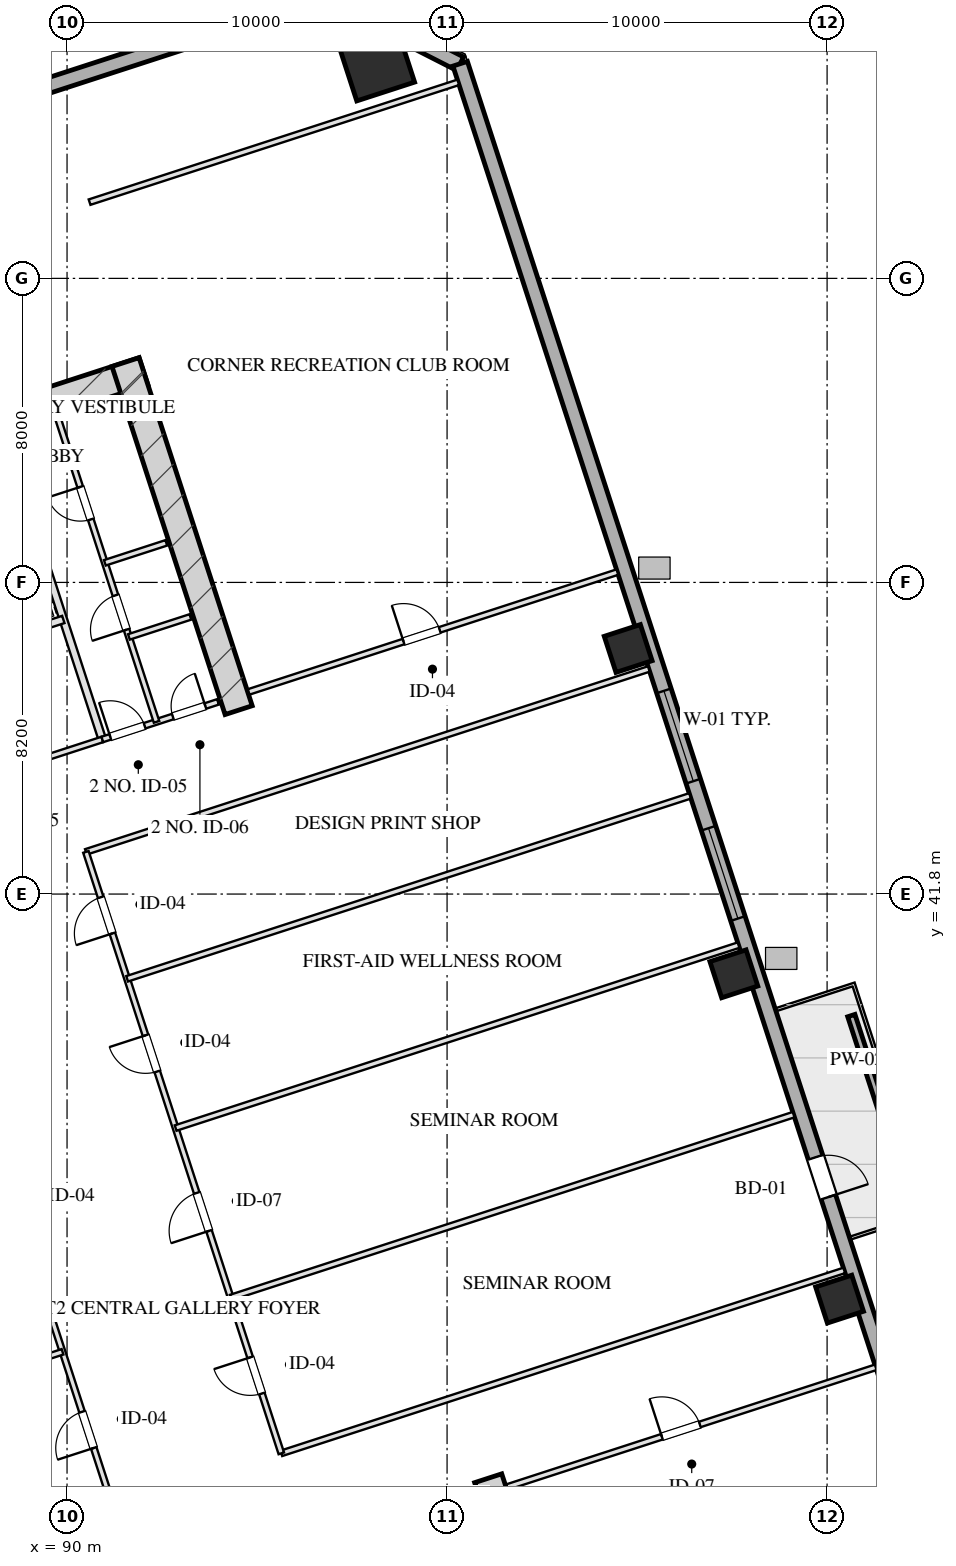
"""IFC4 building model, lengths in metres.
Left out: names, types, materials, properties, quantities, classifications, styles, units other than length and angle.
Written with IfcOpenShell. Run it as: python <this file> out.ifc"""

import sys

from ifc_helpers import new_model, si_unit, direction, frame, frame_2d, origin, origin_2d, place, context, subcontext, project, spatial, rectangle, hollow_rectangle, extrude, element, fill, save


model = new_model("IFC4")
c1 = context("Model", 3, precision=1e-05, world=origin(), true_north=direction((0.0, 1.0)))
c2 = subcontext(c1, "Body", "Model", "MODEL_VIEW")
j1 = project(units=[si_unit("LENGTHUNIT", "METRE"), si_unit("PLANEANGLEUNIT", "RADIAN")], contexts=[c1])
p1 = place(None, origin())
s1 = spatial("IfcSite", under=j1, at=p1, CompositionType="ELEMENT")
p2 = place(p1, origin())
s2 = spatial("IfcBuilding", under=s1, at=p2, CompositionType="ELEMENT")
p3 = place(p2, frame((0.0, 0.0, 67.85)))
s3 = spatial("IfcBuildingStorey", under=s2, at=p3, CompositionType="ELEMENT", Elevation=67.85)
p4 = place(p3, frame((101.082, 26.429, 0.0), z_axis=(0.0, 0.0, 1.0), x_axis=(0.309016134813, -0.951056795583, 0.0)))
e1 = element("IfcWall", 1, at=p4, inside=s3, PredefinedType="SHEAR", context=c2, shape_type="SweptSolid", body=[
    extrude(rectangle(XDim=9.63, YDim=0.75, at=frame_2d((4.815, 0.0))), origin(), (0.0, 0.0, 1.0), 3.45),
])
p5 = place(p3, frame((76.272, 50.443, 0.0), z_axis=(0.0, 0.0, 1.0), x_axis=(0.951056072937, 0.309018358888, 0.0)))
e2 = element("IfcWall", 2, at=p5, inside=s3, PredefinedType="SHEAR", context=c2, shape_type="SweptSolid", body=[
    extrude(rectangle(XDim=16.55, YDim=0.75, at=frame_2d((8.275, 0.0))), origin(), (0.0, 0.0, 1.0), 3.45),
])
p6 = place(p3, frame((94.515, 46.639, 0.0), z_axis=(0.0, 0.0, 1.0), x_axis=(-0.309016134813, 0.951056795583, 0.0)))
e3 = element("IfcWall", 3, at=p6, inside=s3, PredefinedType="SHEAR", context=c2, shape_type="SweptSolid", body=[
    extrude(rectangle(XDim=9.63, YDim=0.75, at=frame_2d((4.815, 0.0))), origin(), (0.0, 0.0, 1.0), 3.45),
])
p7 = place(p3, frame((98.137, 63.677, 0.0), z_axis=(0.0, 0.0, 1.0), x_axis=(0.951056516295, 0.309016994375, 0.0)))
e4 = element("IfcColumn", 4, at=p7, inside=s3, PredefinedType="COLUMN", context=c2, shape_type="SweptSolid", body=[
    extrude(hollow_rectangle(XDim=1.6, YDim=1.6, WallThickness=0.055, at=origin_2d()), origin(), (0.0, 0.0, 1.0), 3.451),
])
for number, where, z_axis, x_axis in (
    (5, (110.328, 31.142, 0.0), (0.0, 0.0, 1.0), (0.951, 0.309, 0.0)),
    (6, (107.547, 39.701, 0.0), (0.0, 0.0, 1.0), (0.951, 0.309, 0.0)),
    (7, (104.766, 48.261, 0.0), (0.0, 0.0, 1.0), (0.951, 0.309, 0.0)),
):
    element("IfcColumn", number, at=place(p3, frame(where, z_axis=z_axis, x_axis=x_axis)), inside=s3, PredefinedType="COLUMN", context=c2, shape_type="SweptSolid", body=[
        extrude(hollow_rectangle(XDim=1.0, YDim=1.0, WallThickness=0.036, at=origin_2d()), origin(), (0.0, 0.0, 1.0), 3.451),
    ])
p8 = place(p3, frame((66.002, 55.433, 0.0), z_axis=(0.0, 0.0, 1.0), x_axis=(0.951055939317, 0.309018770125, 0.0)))
e8 = element("IfcWall", 8, at=p8, inside=s3, PredefinedType="SOLIDWALL", context=c2, shape_type="SweptSolid", body=[
    extrude(rectangle(XDim=32.4, YDim=0.4, at=frame_2d((16.2, 0.0))), origin(), (0.0, 0.0, 1.0), 2.61),
])
p9 = place(p3, frame((96.816, 65.446, 0.0), z_axis=(0.0, 0.0, 1.0), x_axis=(0.890998089617, -0.454007053137, 0.0)))
e9 = element("IfcWall", 9, at=p9, inside=s3, PredefinedType="SOLIDWALL", context=c2, shape_type="SweptSolid", body=[
    extrude(rectangle(XDim=3.96, YDim=0.4, at=frame_2d((1.98, 0.0))), origin(), (0.0, 0.0, 1.0), 2.61),
])
p10 = place(p3, frame((100.345, 63.648, 0.0), z_axis=(0.0, 0.0, 1.0), x_axis=(0.309014526607, -0.951057318118, 0.0)))
e10 = element("IfcWall", 10, at=p10, inside=s3, PredefinedType="SOLIDWALL", context=c2, shape_type="SweptSolid", body=[
    extrude(rectangle(XDim=50.0, YDim=0.4, at=frame_2d((25.0, 0.0))), origin(), (0.0, 0.0, 1.0), 2.61),
])
p11 = place(p10, frame((21.15, 0.0, 0.75)))
e11 = element("IfcOpeningElement", 11, at=p11, cuts=e10, PredefinedType="OPENING", context=c2, shape_type="SweptSolid", body=[
    extrude(rectangle(XDim=2.5, YDim=1.46, at=frame_2d((1.25, 0.73))), frame((0.0, 0.21, 0.0), z_axis=(0.0, -1.0, 0.0), x_axis=(1.0, 0.0, 0.0)), (0.0, 0.0, 1.0), 0.42),
])
p12 = place(p10, frame((17.35, 0.0, 0.75)))
e12 = element("IfcOpeningElement", 12, at=p12, cuts=e10, PredefinedType="OPENING", context=c2, shape_type="SweptSolid", body=[
    extrude(rectangle(XDim=2.5, YDim=1.46, at=frame_2d((1.25, 0.73))), frame((0.0, 0.21, 0.0), z_axis=(0.0, -1.0, 0.0), x_axis=(1.0, 0.0, 0.0)), (0.0, 0.0, 1.0), 0.42),
])
p13 = place(p10, frame((30.255, 0.0, 0.0)))
e13 = element("IfcOpeningElement", 13, at=p13, cuts=e10, PredefinedType="OPENING", context=c2, shape_type="SweptSolid", body=[
    extrude(rectangle(XDim=1.1, YDim=2.15, at=frame_2d((0.55, 1.075))), frame((0.0, 0.21, 0.0), z_axis=(0.0, -1.0, 0.0), x_axis=(1.0, 0.0, 0.0)), (0.0, 0.0, 1.0), 0.42),
])
p14 = place(p3, frame((112.121, 34.038, 0.0), z_axis=(0.0, 0.0, 1.0), x_axis=(-0.309032019345, 0.951051634255, 0.0)))
e14 = element("IfcWall", 14, at=p14, inside=s3, PredefinedType="PARAPET", context=c2, shape_type="SweptSolid", body=[
    extrude(rectangle(XDim=4.8, YDim=0.2, at=frame_2d((2.4, 0.0))), origin(), (0.0, 0.0, 1.0), 0.75),
])
p15 = place(p3, frame((90.928, 45.868, 0.0), z_axis=(0.0, 0.0, 1.0), x_axis=(-0.309042196757, 0.951048327176, 0.0)))
e15 = element("IfcWall", 15, at=p15, inside=s3, PredefinedType="PARTITIONING", context=c2, shape_type="SweptSolid", body=[
    extrude(rectangle(XDim=8.43, YDim=0.2, at=frame_2d((4.215, 0.0))), origin(), (0.0, 0.0, 1.0), 3.175),
])
p16 = place(p3, frame((86.743, 44.508, 0.0), z_axis=(0.0, 0.0, 1.0), x_axis=(0.951063829732, 0.308994485023, 0.0)))
e16 = element("IfcWall", 16, at=p16, inside=s3, PredefinedType="PARTITIONING", context=c2, shape_type="SweptSolid", body=[
    extrude(rectangle(XDim=4.4, YDim=0.15, at=frame_2d((2.2, 0.0))), origin(), (0.0, 0.0, 1.0), 3.175),
])
p17 = place(p16, frame((1.45, 0.0, 0.0)))
e17 = element("IfcOpeningElement", 17, at=p17, cuts=e16, PredefinedType="OPENING", context=c2, shape_type="SweptSolid", body=[
    extrude(rectangle(XDim=1.5, YDim=2.05, at=frame_2d((0.75, 1.025))), frame((0.0, 0.085, 0.0), z_axis=(0.0, -1.0, 0.0), x_axis=(1.0, 0.0, 0.0)), (0.0, 0.0, 1.0), 0.17),
])
p18 = place(p3, frame((85.718, 47.666, 0.0), z_axis=(0.0, 0.0, 1.0), x_axis=(0.951058531764, 0.30901079133, 0.0)))
e18 = element("IfcWall", 18, at=p18, inside=s3, PredefinedType="PARTITIONING", context=c2, shape_type="SweptSolid", body=[
    extrude(rectangle(XDim=4.4, YDim=0.2, at=frame_2d((2.2, 0.0))), origin(), (0.0, 0.0, 1.0), 3.175),
])
p19 = place(p18, frame((0.45, 0.0, 0.0)))
e19 = element("IfcOpeningElement", 19, at=p19, cuts=e18, PredefinedType="OPENING", context=c2, shape_type="SweptSolid", body=[
    extrude(rectangle(XDim=1.1, YDim=2.05, at=frame_2d((0.55, 1.025))), frame((0.0, 0.11, 0.0), z_axis=(0.0, -1.0, 0.0), x_axis=(1.0, 0.0, 0.0)), (0.0, 0.0, 1.0), 0.22),
])
p20 = place(p18, frame((2.55, 0.0, 0.0)))
e20 = element("IfcOpeningElement", 20, at=p20, cuts=e18, PredefinedType="OPENING", context=c2, shape_type="SweptSolid", body=[
    extrude(rectangle(XDim=1.1, YDim=2.05, at=frame_2d((0.55, 1.025))), frame((0.0, 0.11, 0.0), z_axis=(0.0, -1.0, 0.0), x_axis=(1.0, 0.0, 0.0)), (0.0, 0.0, 1.0), 0.22),
])
p21 = place(p3, frame((90.928, 45.868, 0.0), z_axis=(0.0, 0.0, 1.0), x_axis=(0.951059297078, 0.309008435874, 0.0)))
e21 = element("IfcWall", 21, at=p21, inside=s3, PredefinedType="PARTITIONING", context=c2, shape_type="SweptSolid", body=[
    extrude(rectangle(XDim=3.2, YDim=0.15, at=frame_2d((1.6, 0.0))), origin(), (0.0, 0.0, 1.0), 3.175),
])
p22 = place(p21, frame((0.22, 0.0, 0.0)))
e22 = element("IfcOpeningElement", 22, at=p22, cuts=e21, PredefinedType="OPENING", context=c2, shape_type="SweptSolid", body=[
    extrude(rectangle(XDim=0.95, YDim=2.05, at=frame_2d((0.475, 1.025))), frame((0.0, 0.085, 0.0), z_axis=(0.0, -1.0, 0.0), x_axis=(1.0, 0.0, 0.0)), (0.0, 0.0, 1.0), 0.17),
])
p23 = place(p21, frame((1.95, 0.0, 0.0)))
e23 = element("IfcOpeningElement", 23, at=p23, cuts=e21, PredefinedType="OPENING", context=c2, shape_type="SweptSolid", body=[
    extrude(rectangle(XDim=0.9, YDim=2.05, at=frame_2d((0.45, 1.025))), frame((0.0, 0.085, 0.0), z_axis=(0.0, -1.0, 0.0), x_axis=(1.0, 0.0, 0.0)), (0.0, 0.0, 1.0), 0.17),
])
p24 = place(p3, frame((92.355, 46.331, 0.0), z_axis=(0.0, 0.0, 1.0), x_axis=(-0.309007490203, 0.951059604335, 0.0)))
e24 = element("IfcWall", 24, at=p24, inside=s3, PredefinedType="PARTITIONING", context=c2, shape_type="SweptSolid", body=[
    extrude(rectangle(XDim=8.43, YDim=0.15, at=frame_2d((4.215, 0.0))), origin(), (0.0, 0.0, 1.0), 3.175),
])
p25 = place(p24, frame((2.55, 0.0, 0.0)))
e25 = element("IfcOpeningElement", 25, at=p25, cuts=e24, PredefinedType="OPENING", context=c2, shape_type="SweptSolid", body=[
    extrude(rectangle(XDim=0.95, YDim=2.05, at=frame_2d((0.475, 1.025))), frame((0.0, 0.085, 0.0), z_axis=(0.0, -1.0, 0.0), x_axis=(1.0, 0.0, 0.0)), (0.0, 0.0, 1.0), 0.17),
])
p26 = place(p24, frame((5.6, 0.0, 0.0)))
e26 = element("IfcOpeningElement", 26, at=p26, cuts=e24, PredefinedType="OPENING", context=c2, shape_type="SweptSolid", body=[
    extrude(rectangle(XDim=0.9, YDim=2.05, at=frame_2d((0.45, 1.025))), frame((0.0, 0.085, 0.0), z_axis=(0.0, -1.0, 0.0), x_axis=(1.0, 0.0, 0.0)), (0.0, 0.0, 1.0), 0.17),
])
p27 = place(p3, frame((90.995, 50.516, 0.0), z_axis=(0.0, 0.0, 1.0), x_axis=(0.951040401051, 0.309066587596, 0.0)))
e27 = element("IfcWall", 27, at=p27, inside=s3, PredefinedType="PARTITIONING", context=c2, shape_type="SweptSolid", body=[
    extrude(rectangle(XDim=1.7, YDim=0.15, at=frame_2d((0.85, 0.0))), origin(), (0.0, 0.0, 1.0), 3.175),
])
p28 = place(p3, frame((91.628, 48.566, 0.0), z_axis=(0.0, 0.0, 1.0), x_axis=(0.951054116971, 0.309024378638, 0.0)))
e28 = element("IfcWall", 28, at=p28, inside=s3, PredefinedType="PARTITIONING", context=c2, shape_type="SweptSolid", body=[
    extrude(rectangle(XDim=1.7, YDim=0.15, at=frame_2d((0.85, 0.0))), origin(), (0.0, 0.0, 1.0), 3.175),
])
p29 = place(p3, frame((101.578, 26.196, 0.0), z_axis=(0.0, 0.0, 1.0), x_axis=(0.951059043131, 0.309009217467, 0.0)))
e29 = element("IfcWall", 29, at=p29, inside=s3, PredefinedType="PARTITIONING", context=c2, shape_type="SweptSolid", body=[
    extrude(rectangle(XDim=10.2, YDim=0.15, at=frame_2d((5.1, 0.0))), origin(), (0.0, 0.0, 1.0), 3.175),
])
p30 = place(p29, frame((4.284, 0.0, 0.0)))
e30 = element("IfcOpeningElement", 30, at=p30, cuts=e29, PredefinedType="OPENING", context=c2, shape_type="SweptSolid", body=[
    extrude(rectangle(XDim=1.05, YDim=2.05, at=frame_2d((0.525, 1.025))), frame((0.0, 0.085, 0.0), z_axis=(0.0, -1.0, 0.0), x_axis=(1.0, 0.0, 0.0)), (0.0, 0.0, 1.0), 0.17),
])
p31 = place(p3, frame((90.593, 60.006, 0.0), z_axis=(0.0, 0.0, 1.0), x_axis=(0.951059043131, 0.309009217467, 0.0)))
e31 = element("IfcWall", 31, at=p31, inside=s3, PredefinedType="PARTITIONING", context=c2, shape_type="SweptSolid", body=[
    extrude(rectangle(XDim=10.2, YDim=0.15, at=frame_2d((5.1, 0.0))), origin(), (0.0, 0.0, 1.0), 3.175),
])
p32 = place(p3, frame((94.78, 47.119, 0.0), z_axis=(0.0, 0.0, 1.0), x_axis=(0.951054294345, 0.309023832749, 0.0)))
e32 = element("IfcWall", 32, at=p32, inside=s3, PredefinedType="PARTITIONING", context=c2, shape_type="SweptSolid", body=[
    extrude(rectangle(XDim=10.2, YDim=0.15, at=frame_2d((5.1, 0.0))), origin(), (0.0, 0.0, 1.0), 3.175),
])
p33 = place(p32, frame((4.284, 0.0, 0.0)))
e33 = element("IfcOpeningElement", 33, at=p33, cuts=e32, PredefinedType="OPENING", context=c2, shape_type="SweptSolid", body=[
    extrude(rectangle(XDim=1.0, YDim=2.05, at=frame_2d((0.5, 1.025))), frame((0.0, 0.085, 0.0), z_axis=(0.0, -1.0, 0.0), x_axis=(1.0, 0.0, 0.0)), (0.0, 0.0, 1.0), 0.17),
])
for number, where, z_axis, x_axis in (
    (34, (95.638, 27.084, 0.0), (0.0, 0.0, 1.0), (0.951, 0.309, 0.0)),
    (35, (90.496, 42.909, 0.0), (0.0, 0.0, 1.0), (0.951, 0.309, 0.0)),
):
    element("IfcWall", number, at=place(p3, frame(where, z_axis=z_axis, x_axis=x_axis)), inside=s3, PredefinedType="PARTITIONING", context=c2, shape_type="SweptSolid", body=[
        extrude(rectangle(XDim=15.575, YDim=0.15, at=frame_2d((7.788, 0.0))), origin(), (0.0, 0.0, 1.0), 3.175),
    ])
p34 = place(p3, frame((91.216, 25.647, 0.0), z_axis=(0.0, 0.0, 1.0), x_axis=(-0.309022042254, 0.951054876125, 0.0)))
e36 = element("IfcWall", 36, at=p34, inside=s3, PredefinedType="PARTITIONING", context=c2, shape_type="SweptSolid", body=[
    extrude(rectangle(XDim=16.64, YDim=0.15, at=frame_2d((8.32, 0.0))), origin(), (0.0, 0.0, 1.0), 3.175),
])
p35 = place(p34, frame((1.66, 0.0, 0.0)))
e37 = element("IfcOpeningElement", 37, at=p35, cuts=e36, PredefinedType="OPENING", context=c2, shape_type="SweptSolid", body=[
    extrude(rectangle(XDim=1.0, YDim=2.05, at=frame_2d((0.5, 1.025))), frame((0.0, 0.085, 0.0), z_axis=(0.0, -1.0, 0.0), x_axis=(1.0, 0.0, 0.0)), (0.0, 0.0, 1.0), 0.17),
])
p36 = place(p34, frame((7.82, 0.0, 0.0)))
e38 = element("IfcOpeningElement", 38, at=p36, cuts=e36, PredefinedType="OPENING", context=c2, shape_type="SweptSolid", body=[
    extrude(rectangle(XDim=1.0, YDim=2.05, at=frame_2d((0.5, 1.025))), frame((0.0, 0.085, 0.0), z_axis=(0.0, -1.0, 0.0), x_axis=(1.0, 0.0, 0.0)), (0.0, 0.0, 1.0), 0.17),
])
p37 = place(p34, frame((13.98, 0.0, 0.0)))
e39 = element("IfcOpeningElement", 39, at=p37, cuts=e36, PredefinedType="OPENING", context=c2, shape_type="SweptSolid", body=[
    extrude(rectangle(XDim=1.0, YDim=2.05, at=frame_2d((0.5, 1.025))), frame((0.0, 0.085, 0.0), z_axis=(0.0, -1.0, 0.0), x_axis=(1.0, 0.0, 0.0)), (0.0, 0.0, 1.0), 0.17),
])
p38 = place(p3, frame((95.638, 27.084, 0.0), z_axis=(0.0, 0.0, 1.0), x_axis=(-0.30901773025, 0.951056277195, 0.0)))
e40 = element("IfcWall", 40, at=p38, inside=s3, PredefinedType="PARTITIONING", context=c2, shape_type="SweptSolid", body=[
    extrude(rectangle(XDim=16.64, YDim=0.15, at=frame_2d((8.32, 0.0))), origin(), (0.0, 0.0, 1.0), 3.175),
])
p39 = place(p38, frame((1.655, 0.0, 0.0)))
e41 = element("IfcOpeningElement", 41, at=p39, cuts=e40, PredefinedType="OPENING", context=c2, shape_type="SweptSolid", body=[
    extrude(rectangle(XDim=1.0, YDim=2.05, at=frame_2d((0.5, 1.025))), frame((0.0, 0.085, 0.0), z_axis=(0.0, -1.0, 0.0), x_axis=(1.0, 0.0, 0.0)), (0.0, 0.0, 1.0), 0.17),
])
p40 = place(p38, frame((6.155, 0.0, 0.0)))
e42 = element("IfcOpeningElement", 42, at=p40, cuts=e40, PredefinedType="OPENING", context=c2, shape_type="SweptSolid", body=[
    extrude(rectangle(XDim=1.05, YDim=2.05, at=frame_2d((0.525, 1.025))), frame((0.0, 0.085, 0.0), z_axis=(0.0, -1.0, 0.0), x_axis=(1.0, 0.0, 0.0)), (0.0, 0.0, 1.0), 0.17),
])
p41 = place(p38, frame((10.565, 0.0, 0.0)))
e43 = element("IfcOpeningElement", 43, at=p41, cuts=e40, PredefinedType="OPENING", context=c2, shape_type="SweptSolid", body=[
    extrude(rectangle(XDim=1.0, YDim=2.05, at=frame_2d((0.5, 1.025))), frame((0.0, 0.085, 0.0), z_axis=(0.0, -1.0, 0.0), x_axis=(1.0, 0.0, 0.0)), (0.0, 0.0, 1.0), 0.17),
])
p42 = place(p38, frame((14.385, 0.0, 0.0)))
e44 = element("IfcOpeningElement", 44, at=p42, cuts=e40, PredefinedType="OPENING", context=c2, shape_type="SweptSolid", body=[
    extrude(rectangle(XDim=1.0, YDim=2.05, at=frame_2d((0.5, 1.025))), frame((0.0, 0.085, 0.0), z_axis=(0.0, -1.0, 0.0), x_axis=(1.0, 0.0, 0.0)), (0.0, 0.0, 1.0), 0.17),
])
p43 = place(p3, frame((73.356, 24.386, 0.0), z_axis=(0.0, 0.0, 1.0), x_axis=(0.951057299418, 0.309014584159, 0.0)))
e45 = element("IfcWall", 45, at=p43, inside=s3, PredefinedType="PARTITIONING", context=c2, shape_type="SweptSolid", body=[
    extrude(rectangle(XDim=17.375, YDim=0.15, at=frame_2d((8.688, 0.0))), origin(), (0.0, 0.0, 1.0), 3.175),
])
for number, where, z_axis, x_axis in (
    (46, (94.306, 31.183, 0.0), (0.0, 0.0, 1.0), (0.951, 0.309, 0.0)),
    (47, (92.857, 35.643, 0.0), (0.0, 0.0, 1.0), (0.951, 0.309, 0.0)),
    (48, (91.581, 39.57, 0.0), (0.0, 0.0, 1.0), (0.951, 0.309, 0.0)),
):
    element("IfcWall", number, at=place(p3, frame(where, z_axis=z_axis, x_axis=x_axis)), inside=s3, PredefinedType="PARTITIONING", context=c2, shape_type="SweptSolid", body=[
        extrude(rectangle(XDim=15.575, YDim=0.15, at=frame_2d((7.788, 0.0))), origin(), (0.0, 0.0, 1.0), 3.175),
    ])
p44 = place(p11, origin())
e49 = element("IfcWindow", 49, at=p44, inside=s3, PartitioningType="TRIPLE_PANEL_VERTICAL", PredefinedType="WINDOW", context=c2, shape_type="SweptSolid", body=[
    extrude(rectangle(XDim=2.5, YDim=1.46, at=frame_2d((1.25, 0.73))), frame((0.0, 0.03, 0.0), z_axis=(0.0, -1.0, 0.0), x_axis=(1.0, 0.0, 0.0)), (0.0, 0.0, 1.0), 0.06),
])
fill(e11, e49)
p45 = place(p12, origin())
e50 = element("IfcWindow", 50, at=p45, inside=s3, PartitioningType="TRIPLE_PANEL_VERTICAL", PredefinedType="WINDOW", context=c2, shape_type="SweptSolid", body=[
    extrude(rectangle(XDim=2.5, YDim=1.46, at=frame_2d((1.25, 0.73))), frame((0.0, 0.03, 0.0), z_axis=(0.0, -1.0, 0.0), x_axis=(1.0, 0.0, 0.0)), (0.0, 0.0, 1.0), 0.06),
])
fill(e12, e50)
p46 = place(p13, origin())
e51 = element("IfcDoor", 51, at=p46, inside=s3, OperationType="SINGLE_SWING_RIGHT", PredefinedType="DOOR", context=c2, shape_type="SweptSolid", body=[
    extrude(rectangle(XDim=1.1, YDim=2.15, at=frame_2d((0.55, 1.075))), frame((0.0, 0.025, 0.0), z_axis=(0.0, -1.0, 0.0), x_axis=(1.0, 0.0, 0.0)), (0.0, 0.0, 1.0), 0.05),
])
fill(e13, e51)
p47 = place(p22, origin())
e52 = element("IfcDoor", 52, at=p47, inside=s3, OperationType="SINGLE_SWING_LEFT", PredefinedType="DOOR", context=c2, shape_type="SweptSolid", body=[
    extrude(rectangle(XDim=0.95, YDim=2.05, at=frame_2d((0.475, 1.025))), frame((0.0, 0.025, 0.0), z_axis=(0.0, -1.0, 0.0), x_axis=(1.0, 0.0, 0.0)), (0.0, 0.0, 1.0), 0.05),
])
fill(e22, e52)
p48 = place(p23, origin())
e53 = element("IfcDoor", 53, at=p48, inside=s3, OperationType="SINGLE_SWING_RIGHT", PredefinedType="DOOR", context=c2, shape_type="SweptSolid", body=[
    extrude(rectangle(XDim=0.9, YDim=2.05, at=frame_2d((0.45, 1.025))), frame((0.0, 0.025, 0.0), z_axis=(0.0, -1.0, 0.0), x_axis=(1.0, 0.0, 0.0)), (0.0, 0.0, 1.0), 0.05),
])
fill(e23, e53)
p49 = place(p25, origin())
e54 = element("IfcDoor", 54, at=p49, inside=s3, OperationType="SINGLE_SWING_LEFT", PredefinedType="DOOR", context=c2, shape_type="SweptSolid", body=[
    extrude(rectangle(XDim=0.95, YDim=2.05, at=frame_2d((0.475, 1.025))), frame((0.0, 0.025, 0.0), z_axis=(0.0, -1.0, 0.0), x_axis=(1.0, 0.0, 0.0)), (0.0, 0.0, 1.0), 0.05),
])
fill(e25, e54)
p50 = place(p26, origin())
e55 = element("IfcDoor", 55, at=p50, inside=s3, OperationType="SINGLE_SWING_RIGHT", PredefinedType="DOOR", context=c2, shape_type="SweptSolid", body=[
    extrude(rectangle(XDim=0.9, YDim=2.05, at=frame_2d((0.45, 1.025))), frame((0.0, 0.025, 0.0), z_axis=(0.0, -1.0, 0.0), x_axis=(1.0, 0.0, 0.0)), (0.0, 0.0, 1.0), 0.05),
])
fill(e26, e55)
p51 = place(p30, origin())
e56 = element("IfcDoor", 56, at=p51, inside=s3, OperationType="SINGLE_SWING_LEFT", PredefinedType="DOOR", context=c2, shape_type="SweptSolid", body=[
    extrude(rectangle(XDim=1.05, YDim=2.05, at=frame_2d((0.525, 1.025))), frame((0.0, 0.025, 0.0), z_axis=(0.0, -1.0, 0.0), x_axis=(1.0, 0.0, 0.0)), (0.0, 0.0, 1.0), 0.05),
])
fill(e30, e56)
p52 = place(p33, origin())
e57 = element("IfcDoor", 57, at=p52, inside=s3, OperationType="SINGLE_SWING_LEFT", PredefinedType="DOOR", context=c2, shape_type="SweptSolid", body=[
    extrude(rectangle(XDim=1.0, YDim=2.05, at=frame_2d((0.5, 1.025))), frame((0.0, 0.025, 0.0), z_axis=(0.0, -1.0, 0.0), x_axis=(1.0, 0.0, 0.0)), (0.0, 0.0, 1.0), 0.05),
])
fill(e33, e57)
p53 = place(p35, origin())
e58 = element("IfcDoor", 58, at=p53, inside=s3, OperationType="SINGLE_SWING_LEFT", PredefinedType="DOOR", context=c2, shape_type="SweptSolid", body=[
    extrude(rectangle(XDim=1.0, YDim=2.05, at=frame_2d((0.5, 1.025))), frame((0.0, 0.025, 0.0), z_axis=(0.0, -1.0, 0.0), x_axis=(1.0, 0.0, 0.0)), (0.0, 0.0, 1.0), 0.05),
])
fill(e37, e58)
p54 = place(p39, origin())
e59 = element("IfcDoor", 59, at=p54, inside=s3, OperationType="SINGLE_SWING_RIGHT", PredefinedType="DOOR", context=c2, shape_type="SweptSolid", body=[
    extrude(rectangle(XDim=1.0, YDim=2.05, at=frame_2d((0.5, 1.025))), frame((0.0, 0.025, 0.0), z_axis=(0.0, -1.0, 0.0), x_axis=(1.0, 0.0, 0.0)), (0.0, 0.0, 1.0), 0.05),
])
fill(e41, e59)
p55 = place(p40, origin())
e60 = element("IfcDoor", 60, at=p55, inside=s3, OperationType="SINGLE_SWING_LEFT", PredefinedType="DOOR", context=c2, shape_type="SweptSolid", body=[
    extrude(rectangle(XDim=1.05, YDim=2.05, at=frame_2d((0.525, 1.025))), frame((0.0, 0.025, 0.0), z_axis=(0.0, -1.0, 0.0), x_axis=(1.0, 0.0, 0.0)), (0.0, 0.0, 1.0), 0.05),
])
fill(e42, e60)
p56 = place(p41, origin())
e61 = element("IfcDoor", 61, at=p56, inside=s3, OperationType="SINGLE_SWING_RIGHT", PredefinedType="DOOR", context=c2, shape_type="SweptSolid", body=[
    extrude(rectangle(XDim=1.0, YDim=2.05, at=frame_2d((0.5, 1.025))), frame((0.0, 0.025, 0.0), z_axis=(0.0, -1.0, 0.0), x_axis=(1.0, 0.0, 0.0)), (0.0, 0.0, 1.0), 0.05),
])
fill(e43, e61)
p57 = place(p42, origin())
e62 = element("IfcDoor", 62, at=p57, inside=s3, OperationType="SINGLE_SWING_LEFT", PredefinedType="DOOR", context=c2, shape_type="SweptSolid", body=[
    extrude(rectangle(XDim=1.0, YDim=2.05, at=frame_2d((0.5, 1.025))), frame((0.0, 0.025, 0.0), z_axis=(0.0, -1.0, 0.0), x_axis=(1.0, 0.0, 0.0)), (0.0, 0.0, 1.0), 0.05),
])
fill(e44, e62)
save(model, sys.argv[1])
